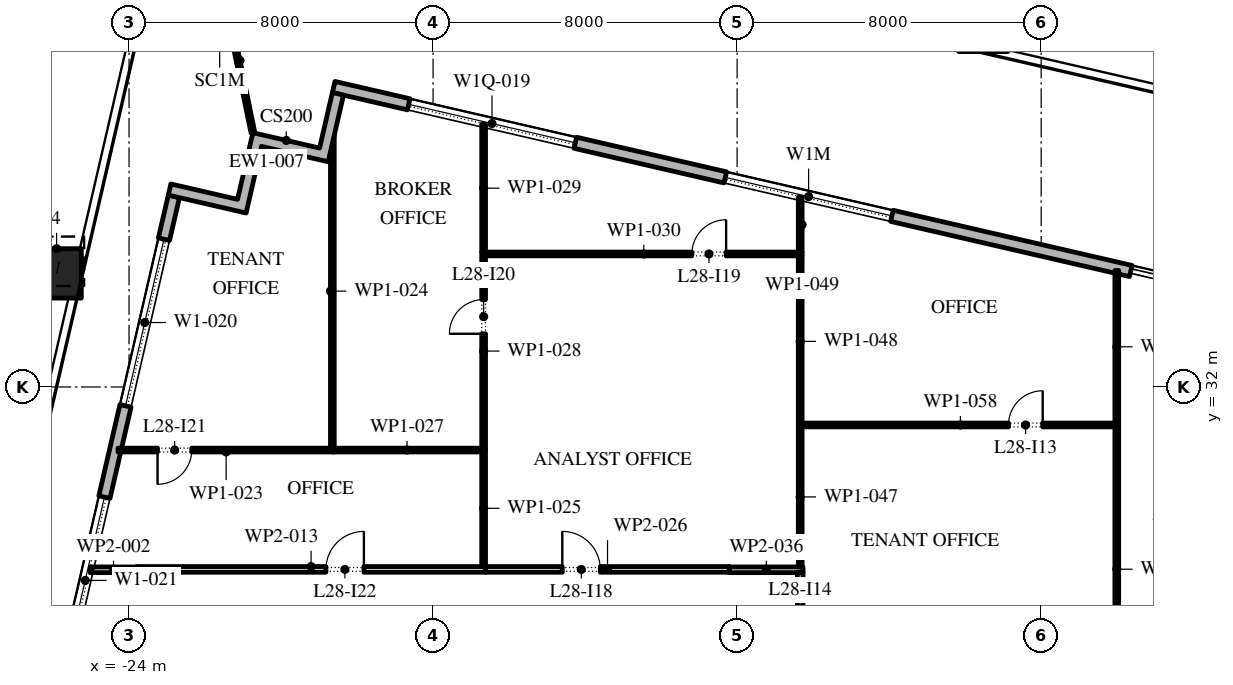
"""IFC4 building model, lengths in metres.
Left out: names, types, materials, properties, quantities, classifications, styles, units other than length and angle.
Written with IfcOpenShell. Run it as: python <this file> out.ifc"""

import sys

from ifc_helpers import new_model, si_unit, direction, frame, frame_2d, origin, origin_2d, place, context, subcontext, project, spatial, polyline, rectangle, outline, extrude, element, fill, save


model = new_model("IFC4")
c1 = context("Model", 3, precision=1e-05, world=origin(), true_north=direction((0.0, 1.0)))
c2 = subcontext(c1, "Body", "Model", "MODEL_VIEW")
j1 = project(units=[si_unit("LENGTHUNIT", "METRE"), si_unit("PLANEANGLEUNIT", "RADIAN")], contexts=[c1])
p1 = place(None, origin())
s1 = spatial("IfcSite", under=j1, at=p1, CompositionType="ELEMENT")
p2 = place(p1, origin())
s2 = spatial("IfcBuilding", under=s1, at=p2, CompositionType="ELEMENT")
p3 = place(p2, frame((0.0, 0.0, 130.8)))
s3 = spatial("IfcBuildingStorey", under=s2, at=p3, CompositionType="ELEMENT", Elevation=130.8)
p4 = place(p3, frame((-1.521, 41.475, 0.0), z_axis=(0.020377597275, 0.088167842757, 0.995897175934), x_axis=(-0.97431566651, 0.225186549318, 0.0)))
e1 = element("IfcColumn", 1, at=p4, inside=s3, PredefinedType="COLUMN", context=c2, shape_type="SweptSolid", body=[
    extrude(rectangle(XDim=1.3, YDim=1.3, at=origin_2d()), origin(), (0.0, 0.0, 1.0), 4.217),
])
p5 = place(p3, frame((-25.906, 34.989, 0.0), z_axis=(0.017502025619, 0.075687567741, 0.996977969259), x_axis=(-0.974290512438, 0.225295355862, 0.0)))
e2 = element("IfcColumn", 2, at=p5, inside=s3, PredefinedType="COLUMN", context=c2, shape_type="SweptSolid", body=[
    extrude(rectangle(XDim=1.3, YDim=1.3, at=origin_2d()), origin(), (0.0, 0.0, 1.0), 4.213),
])
p6 = place(p3, frame((31.078, 28.421, 0.0), z_axis=(0.0, 0.0, 1.0), x_axis=(-0.974370456532, 0.224949357493, 0.0)))
e3 = element("IfcWall", 3, at=p6, inside=s3, PredefinedType="STANDARD", context=c2, shape_type="SweptSolid", body=[
    extrude(rectangle(XDim=51.0, YDim=0.3, at=frame_2d((25.5, 0.0))), origin(), (0.0, 0.0, 1.0), 4.0),
])
p7 = place(p6, frame((1.875, 0.0, 0.45)))
e4 = element("IfcOpeningElement", 4, at=p7, cuts=e3, PredefinedType="OPENING", context=c2, shape_type="SweptSolid", body=[
    extrude(rectangle(XDim=4.5, YDim=2.95, at=frame_2d((2.25, 1.475))), frame((0.0, 0.16, 0.0), z_axis=(0.0, -1.0, 0.0), x_axis=(1.0, 0.0, 0.0)), (0.0, 0.0, 1.0), 0.32),
])
p8 = place(p6, frame((10.275, 0.0, 0.45)))
e5 = element("IfcOpeningElement", 5, at=p8, cuts=e3, PredefinedType="OPENING", context=c2, shape_type="SweptSolid", body=[
    extrude(rectangle(XDim=4.5, YDim=2.825, at=frame_2d((2.25, 1.413))), frame((0.0, 0.16, 0.0), z_axis=(0.0, -1.0, 0.0), x_axis=(1.0, 0.0, 0.0)), (0.0, 0.0, 1.0), 0.32),
])
p9 = place(p6, frame((18.825, 0.0, 0.45)))
e6 = element("IfcOpeningElement", 6, at=p9, cuts=e3, PredefinedType="OPENING", context=c2, shape_type="SweptSolid", body=[
    extrude(rectangle(XDim=4.5, YDim=2.8, at=frame_2d((2.25, 1.4))), frame((0.0, 0.16, 0.0), z_axis=(0.0, -1.0, 0.0), x_axis=(1.0, 0.0, 0.0)), (0.0, 0.0, 1.0), 0.32),
])
p10 = place(p6, frame((27.075, 0.0, 0.0)))
e7 = element("IfcOpeningElement", 7, at=p10, cuts=e3, PredefinedType="OPENING", context=c2, shape_type="SweptSolid", body=[
    extrude(rectangle(XDim=2.4, YDim=3.125, at=frame_2d((1.2, 1.562))), frame((0.0, 0.16, 0.0), z_axis=(0.0, -1.0, 0.0), x_axis=(1.0, 0.0, 0.0)), (0.0, 0.0, 1.0), 0.32),
])
p11 = place(p6, frame((35.925, 0.0, 0.45)))
e8 = element("IfcOpeningElement", 8, at=p11, cuts=e3, PredefinedType="OPENING", context=c2, shape_type="SweptSolid", body=[
    extrude(rectangle(XDim=4.5, YDim=2.575, at=frame_2d((2.25, 1.288))), frame((0.0, 0.16, 0.0), z_axis=(0.0, -1.0, 0.0), x_axis=(1.0, 0.0, 0.0)), (0.0, 0.0, 1.0), 0.32),
])
p12 = place(p6, frame((44.475, 0.0, 0.45)))
e9 = element("IfcOpeningElement", 9, at=p12, cuts=e3, PredefinedType="OPENING", context=c2, shape_type="SweptSolid", body=[
    extrude(rectangle(XDim=4.5, YDim=2.45, at=frame_2d((2.25, 1.225))), frame((0.0, 0.16, 0.0), z_axis=(0.0, -1.0, 0.0), x_axis=(1.0, 0.0, 0.0)), (0.0, 0.0, 1.0), 0.32),
])
p13 = place(p3, frame((-22.82, 37.016, 0.0), z_axis=(0.0, 0.0, 1.0), x_axis=(-0.224953880882, -0.974369412223, 0.0)))
e10 = element("IfcWall", 10, at=p13, inside=s3, PredefinedType="STANDARD", context=c2, shape_type="SweptSolid", body=[
    extrude(rectangle(XDim=49.5, YDim=0.3, at=frame_2d((24.75, 0.0))), origin(), (0.0, 0.0, 1.0), 4.0),
])
p14 = place(p13, frame((1.157, 0.0, 0.45)))
e11 = element("IfcOpeningElement", 11, at=p14, cuts=e10, PredefinedType="OPENING", context=c2, shape_type="SweptSolid", body=[
    extrude(rectangle(XDim=4.5, YDim=3.05, at=frame_2d((2.25, 1.525))), frame((0.0, 0.16, 0.0), z_axis=(0.0, -1.0, 0.0), x_axis=(1.0, 0.0, 0.0)), (0.0, 0.0, 1.0), 0.32),
])
p15 = place(p13, frame((8.121, 0.0, 0.45)))
e12 = element("IfcOpeningElement", 12, at=p15, cuts=e10, PredefinedType="OPENING", context=c2, shape_type="SweptSolid", body=[
    extrude(rectangle(XDim=4.5, YDim=3.05, at=frame_2d((2.25, 1.525))), frame((0.0, 0.16, 0.0), z_axis=(0.0, -1.0, 0.0), x_axis=(1.0, 0.0, 0.0)), (0.0, 0.0, 1.0), 0.32),
])
p16 = place(p13, frame((15.236, 0.0, 0.45)))
e13 = element("IfcOpeningElement", 13, at=p16, cuts=e10, PredefinedType="OPENING", context=c2, shape_type="SweptSolid", body=[
    extrude(rectangle(XDim=4.5, YDim=3.05, at=frame_2d((2.25, 1.525))), frame((0.0, 0.16, 0.0), z_axis=(0.0, -1.0, 0.0), x_axis=(1.0, 0.0, 0.0)), (0.0, 0.0, 1.0), 0.32),
])
p17 = place(p13, frame((23.4, 0.0, 0.0)))
e14 = element("IfcOpeningElement", 14, at=p17, cuts=e10, PredefinedType="OPENING", context=c2, shape_type="SweptSolid", body=[
    extrude(rectangle(XDim=2.4, YDim=3.5, at=frame_2d((1.2, 1.75))), frame((0.0, 0.16, 0.0), z_axis=(0.0, -1.0, 0.0), x_axis=(1.0, 0.0, 0.0)), (0.0, 0.0, 1.0), 0.32),
])
p18 = place(p13, frame((29.464, 0.0, 0.45)))
e15 = element("IfcOpeningElement", 15, at=p18, cuts=e10, PredefinedType="OPENING", context=c2, shape_type="SweptSolid", body=[
    extrude(rectangle(XDim=4.5, YDim=2.875, at=frame_2d((2.25, 1.438))), frame((0.0, 0.16, 0.0), z_axis=(0.0, -1.0, 0.0), x_axis=(1.0, 0.0, 0.0)), (0.0, 0.0, 1.0), 0.32),
])
p19 = place(p13, frame((36.579, 0.0, 0.45)))
e16 = element("IfcOpeningElement", 16, at=p19, cuts=e10, PredefinedType="OPENING", context=c2, shape_type="SweptSolid", body=[
    extrude(rectangle(XDim=4.5, YDim=2.675, at=frame_2d((2.25, 1.337))), frame((0.0, 0.16, 0.0), z_axis=(0.0, -1.0, 0.0), x_axis=(1.0, 0.0, 0.0)), (0.0, 0.0, 1.0), 0.32),
])
p20 = place(p13, frame((43.693, 0.0, 0.45)))
e17 = element("IfcOpeningElement", 17, at=p20, cuts=e10, PredefinedType="OPENING", context=c2, shape_type="SweptSolid", body=[
    extrude(rectangle(XDim=4.5, YDim=3.05, at=frame_2d((2.25, 1.525))), frame((0.0, 0.16, 0.0), z_axis=(0.0, -1.0, 0.0), x_axis=(1.0, 0.0, 0.0)), (0.0, 0.0, 1.0), 0.32),
])
p21 = place(p3, origin())
e18 = element("IfcWall", 18, at=p21, inside=s3, PredefinedType="STANDARD", context=c2, shape_type="SweptSolid", body=[
    extrude(outline(polyline([(-22.967, 37.049), (-22.899, 37.342), (-21.145, 36.937), (-20.74, 38.691), (-18.986, 38.286), (-18.649, 39.747), (-18.357, 39.68), (-18.762, 37.926), (-20.515, 38.331), (-20.92, 36.577), (-22.967, 37.049)])), origin(), (0.0, 0.0, 1.0), 4.0),
])
p22 = place(p3, frame((-20.74, 38.691, -0.05), z_axis=(0.0, 0.0, 1.0), x_axis=(-0.201477998796, 0.979493040302, 0.0)))
e19 = element("IfcWall", 19, at=p22, inside=s3, PredefinedType="STANDARD", context=c2, shape_type="SweptSolid", body=[
    extrude(rectangle(XDim=3.859, YDim=0.1, at=frame_2d((1.93, 0.0))), origin(), (0.0, 0.0, 1.0), 4.05),
])
p23 = place(p3, frame((-25.017, 27.19, 0.0), z_axis=(0.0, 0.0, 1.0), x_axis=(1.0, 0.0, 0.0)))
e20 = element("IfcWall", 20, at=p23, inside=s3, PredefinedType="PARTITIONING", context=c2, shape_type="SweptSolid", body=[
    extrude(rectangle(XDim=1.217, YDim=0.15, at=frame_2d((0.608, 0.0))), origin(), (0.0, 0.0, 1.0), 4.0),
])
p24 = place(p3, frame((-23.8, 27.2, 0.0), z_axis=(0.0, 0.0, 1.0), x_axis=(1.0, 0.0, 0.0)))
e21 = element("IfcWall", 21, at=p24, inside=s3, PredefinedType="PARTITIONING", context=c2, shape_type="SweptSolid", body=[
    extrude(rectangle(XDim=9.18, YDim=0.15, at=frame_2d((4.59, 0.0))), origin(), (0.0, 0.0, 1.0), 4.0),
])
p25 = place(p24, frame((4.98, 0.0, 0.0)))
e22 = element("IfcOpeningElement", 22, at=p25, cuts=e21, PredefinedType="OPENING", context=c2, shape_type="SweptSolid", body=[
    extrude(rectangle(XDim=1.0, YDim=2.1, at=frame_2d((0.5, 1.05))), frame((0.0, 0.085, 0.0), z_axis=(0.0, -1.0, 0.0), x_axis=(1.0, 0.0, 0.0)), (0.0, 0.0, 1.0), 0.17),
])
p26 = place(p3, frame((-18.6, 30.34, 0.0), z_axis=(0.0, 0.0, 1.0), x_axis=(-1.0, 0.0, 0.0)))
e23 = element("IfcWall", 23, at=p26, inside=s3, PredefinedType="PARTITIONING", context=c2, shape_type="SweptSolid", body=[
    extrude(rectangle(XDim=5.69, YDim=0.1, at=frame_2d((2.845, 0.0))), origin(), (0.0, 0.0, 1.0), 4.0),
])
p27 = place(p26, frame((3.75, 0.0, 0.0)))
e24 = element("IfcOpeningElement", 24, at=p27, cuts=e23, PredefinedType="OPENING", context=c2, shape_type="SweptSolid", body=[
    extrude(rectangle(XDim=0.9, YDim=2.1, at=frame_2d((0.45, 1.05))), frame((0.0, 0.06, 0.0), z_axis=(0.0, -1.0, 0.0), x_axis=(1.0, 0.0, 0.0)), (0.0, 0.0, 1.0), 0.12),
])
p28 = place(p3, frame((-18.65, 30.39, 0.0), z_axis=(0.0, 0.0, 1.0), x_axis=(0.0, 1.0, 0.0)))
e25 = element("IfcWall", 25, at=p28, inside=s3, PredefinedType="PARTITIONING", context=c2, shape_type="SweptSolid", body=[
    extrude(rectangle(XDim=8.264, YDim=0.1, at=frame_2d((4.132, 0.0))), origin(), (0.0, 0.0, 1.0), 4.0),
])
p29 = place(p3, frame((-14.67, 27.275, 0.0), z_axis=(0.0, 0.0, 1.0), x_axis=(0.0, 1.0, 0.0)))
e26 = element("IfcWall", 26, at=p29, inside=s3, PredefinedType="PARTITIONING", context=c2, shape_type="SweptSolid", body=[
    extrude(rectangle(XDim=3.065, YDim=0.1, at=frame_2d((1.533, 0.0))), origin(), (0.0, 0.0, 1.0), 4.0),
])
p30 = place(p3, frame((-14.62, 27.2, 0.0), z_axis=(0.0, 0.0, 1.0), x_axis=(1.0, 0.0, 0.0)))
e27 = element("IfcWall", 27, at=p30, inside=s3, PredefinedType="PARTITIONING", context=c2, shape_type="SweptSolid", body=[
    extrude(rectangle(XDim=6.42, YDim=0.15, at=frame_2d((3.21, 0.0))), origin(), (0.0, 0.0, 1.0), 4.0),
])
p31 = place(p30, frame((2.02, 0.0, 0.0)))
e28 = element("IfcOpeningElement", 28, at=p31, cuts=e27, PredefinedType="OPENING", context=c2, shape_type="SweptSolid", body=[
    extrude(rectangle(XDim=1.0, YDim=2.1, at=frame_2d((0.5, 1.05))), frame((0.0, 0.085, 0.0), z_axis=(0.0, -1.0, 0.0), x_axis=(1.0, 0.0, 0.0)), (0.0, 0.0, 1.0), 0.17),
])
p32 = place(p3, frame((-14.72, 30.34, 0.0), z_axis=(0.0, 0.0, 1.0), x_axis=(-1.0, 0.0, 0.0)))
e29 = element("IfcWall", 29, at=p32, inside=s3, PredefinedType="PARTITIONING", context=c2, shape_type="SweptSolid", body=[
    extrude(rectangle(XDim=3.93, YDim=0.1, at=frame_2d((1.965, 0.0))), origin(), (0.0, 0.0, 1.0), 4.0),
])
p33 = place(p3, frame((-14.67, 30.34, 0.0), z_axis=(0.0, 0.0, 1.0), x_axis=(0.0, 1.0, 0.0)))
e30 = element("IfcWall", 30, at=p33, inside=s3, PredefinedType="PARTITIONING", context=c2, shape_type="SweptSolid", body=[
    extrude(rectangle(XDim=5.21, YDim=0.1, at=frame_2d((2.605, 0.0))), origin(), (0.0, 0.0, 1.0), 4.0),
])
p34 = place(p33, frame((3.06, 0.0, 0.0)))
e31 = element("IfcOpeningElement", 31, at=p34, cuts=e30, PredefinedType="OPENING", context=c2, shape_type="SweptSolid", body=[
    extrude(rectangle(XDim=0.9, YDim=2.1, at=frame_2d((0.45, 1.05))), frame((0.0, 0.06, 0.0), z_axis=(0.0, -1.0, 0.0), x_axis=(1.0, 0.0, 0.0)), (0.0, 0.0, 1.0), 0.12),
])
p35 = place(p3, frame((-14.67, 35.55, 0.0), z_axis=(0.0, 0.0, 1.0), x_axis=(0.0, 1.0, 0.0)))
e32 = element("IfcWall", 32, at=p35, inside=s3, PredefinedType="PARTITIONING", context=c2, shape_type="SweptSolid", body=[
    extrude(rectangle(XDim=3.361, YDim=0.1, at=frame_2d((1.68, 0.0))), origin(), (0.0, 0.0, 1.0), 4.0),
])
p36 = place(p3, frame((-14.62, 35.5, 0.0), z_axis=(0.0, 0.0, 1.0), x_axis=(1.0, 0.0, 0.0)))
e33 = element("IfcWall", 33, at=p36, inside=s3, PredefinedType="PARTITIONING", context=c2, shape_type="SweptSolid", body=[
    extrude(rectangle(XDim=8.33, YDim=0.1, at=frame_2d((4.165, 0.0))), origin(), (0.0, 0.0, 1.0), 4.0),
])
p37 = place(p36, frame((5.43, 0.0, 0.0)))
e34 = element("IfcOpeningElement", 34, at=p37, cuts=e33, PredefinedType="OPENING", context=c2, shape_type="SweptSolid", body=[
    extrude(rectangle(XDim=0.9, YDim=2.1, at=frame_2d((0.45, 1.05))), frame((0.0, 0.06, 0.0), z_axis=(0.0, -1.0, 0.0), x_axis=(1.0, 0.0, 0.0)), (0.0, 0.0, 1.0), 0.12),
])
p38 = place(p3, frame((-8.2, 27.19, 0.0), z_axis=(0.0, 0.0, 1.0), x_axis=(1.0, 0.0, 0.0)))
e35 = element("IfcWall", 35, at=p38, inside=s3, PredefinedType="PARTITIONING", context=c2, shape_type="SweptSolid", body=[
    extrude(rectangle(XDim=1.935, YDim=0.15, at=frame_2d((0.968, 0.0))), origin(), (0.0, 0.0, 1.0), 4.0),
])
p39 = place(p3, frame((-6.34, 27.115, 0.0), z_axis=(0.0, 0.0, 1.0), x_axis=(0.0, -1.0, 0.0)))
e36 = element("IfcWall", 36, at=p39, inside=s3, PredefinedType="PARTITIONING", context=c2, shape_type="SweptSolid", body=[
    extrude(rectangle(XDim=3.655, YDim=0.15, at=frame_2d((1.828, 0.0))), origin(), (0.0, 0.0, 1.0), 4.0),
])
p40 = place(p39, frame((1.055, 0.0, 0.0)))
e37 = element("IfcOpeningElement", 37, at=p40, cuts=e36, PredefinedType="OPENING", context=c2, shape_type="SweptSolid", body=[
    extrude(rectangle(XDim=1.0, YDim=2.1, at=frame_2d((0.5, 1.05))), frame((0.0, 0.085, 0.0), z_axis=(0.0, -1.0, 0.0), x_axis=(1.0, 0.0, 0.0)), (0.0, 0.0, 1.0), 0.17),
])
p41 = place(p3, frame((-6.34, 27.265, 0.0), z_axis=(0.0, 0.0, 1.0), x_axis=(0.0, 1.0, 0.0)))
e38 = element("IfcWall", 38, at=p41, inside=s3, PredefinedType="PARTITIONING", context=c2, shape_type="SweptSolid", body=[
    extrude(rectangle(XDim=3.685, YDim=0.1, at=frame_2d((1.843, 0.0))), origin(), (0.0, 0.0, 1.0), 4.0),
])
p42 = place(p3, frame((-6.34, 30.95, 0.0), z_axis=(0.0, 0.0, 1.0), x_axis=(0.0, 1.0, 0.0)))
e39 = element("IfcWall", 39, at=p42, inside=s3, PredefinedType="PARTITIONING", context=c2, shape_type="SweptSolid", body=[
    extrude(rectangle(XDim=4.5, YDim=0.1, at=frame_2d((2.25, 0.0))), origin(), (0.0, 0.0, 1.0), 4.0),
])
p43 = place(p3, frame((-6.34, 35.55, 0.0), z_axis=(0.0, 0.0, 1.0), x_axis=(0.0, 1.0, 0.0)))
e40 = element("IfcWall", 40, at=p43, inside=s3, PredefinedType="PARTITIONING", context=c2, shape_type="SweptSolid", body=[
    extrude(rectangle(XDim=1.438, YDim=0.1, at=frame_2d((0.719, 0.0))), origin(), (0.0, 0.0, 1.0), 4.0),
])
p44 = place(p3, frame((2.04, 31.0, 0.0), z_axis=(0.0, 0.0, 1.0), x_axis=(-1.0, 0.0, 0.0)))
e41 = element("IfcWall", 41, at=p44, inside=s3, PredefinedType="PARTITIONING", context=c2, shape_type="SweptSolid", body=[
    extrude(rectangle(XDim=8.33, YDim=0.1, at=frame_2d((4.165, 0.0))), origin(), (0.0, 0.0, 1.0), 4.0),
])
p45 = place(p44, frame((2.0, 0.0, 0.0)))
e42 = element("IfcOpeningElement", 42, at=p45, cuts=e41, PredefinedType="OPENING", context=c2, shape_type="SweptSolid", body=[
    extrude(rectangle(XDim=0.9, YDim=2.1, at=frame_2d((0.45, 1.05))), frame((0.0, 0.06, 0.0), z_axis=(0.0, -1.0, 0.0), x_axis=(1.0, 0.0, 0.0)), (0.0, 0.0, 1.0), 0.12),
])
p46 = place(p3, frame((1.99, 30.95, 0.0), z_axis=(0.0, 0.0, 1.0), x_axis=(0.0, -1.0, 0.0)))
e43 = element("IfcWall", 43, at=p46, inside=s3, PredefinedType="PARTITIONING", context=c2, shape_type="SweptSolid", body=[
    extrude(rectangle(XDim=7.49, YDim=0.1, at=frame_2d((3.745, 0.0))), origin(), (0.0, 0.0, 1.0), 4.0),
])
p47 = place(p3, frame((1.99, 35.065, 0.0), z_axis=(0.0, 0.0, 1.0), x_axis=(0.0, -1.0, 0.0)))
e44 = element("IfcWall", 44, at=p47, inside=s3, PredefinedType="PARTITIONING", context=c2, shape_type="SweptSolid", body=[
    extrude(rectangle(XDim=4.015, YDim=0.1, at=frame_2d((2.007, 0.0))), origin(), (0.0, 0.0, 1.0), 4.0),
])
p48 = place(p10, origin())
e45 = element("IfcDoor", 45, at=p48, inside=s3, OperationType="DOUBLE_DOOR_SLIDING", PredefinedType="DOOR", context=c2, shape_type="SweptSolid", body=[
    extrude(rectangle(XDim=2.4, YDim=3.125, at=frame_2d((1.2, 1.562))), frame((0.0, 0.025, 0.0), z_axis=(0.0, -1.0, 0.0), x_axis=(1.0, 0.0, 0.0)), (0.0, 0.0, 1.0), 0.05),
])
fill(e7, e45)
p49 = place(p11, origin())
e46 = element("IfcWindow", 46, at=p49, inside=s3, PartitioningType="DOUBLE_PANEL_VERTICAL", PredefinedType="WINDOW", context=c2, shape_type="SweptSolid", body=[
    extrude(rectangle(XDim=4.5, YDim=2.575, at=frame_2d((2.25, 1.288))), frame((0.0, 0.03, 0.0), z_axis=(0.0, -1.0, 0.0), x_axis=(1.0, 0.0, 0.0)), (0.0, 0.0, 1.0), 0.06),
])
fill(e8, e46)
p50 = place(p12, origin())
e47 = element("IfcWindow", 47, at=p50, inside=s3, PartitioningType="DOUBLE_PANEL_VERTICAL", PredefinedType="WINDOW", context=c2, shape_type="SweptSolid", body=[
    extrude(rectangle(XDim=4.5, YDim=2.45, at=frame_2d((2.25, 1.225))), frame((0.0, 0.03, 0.0), z_axis=(0.0, -1.0, 0.0), x_axis=(1.0, 0.0, 0.0)), (0.0, 0.0, 1.0), 0.06),
])
fill(e9, e47)
p51 = place(p14, origin())
e48 = element("IfcWindow", 48, at=p51, inside=s3, PartitioningType="DOUBLE_PANEL_VERTICAL", PredefinedType="WINDOW", context=c2, shape_type="SweptSolid", body=[
    extrude(rectangle(XDim=4.5, YDim=3.05, at=frame_2d((2.25, 1.525))), frame((0.0, 0.03, 0.0), z_axis=(0.0, -1.0, 0.0), x_axis=(1.0, 0.0, 0.0)), (0.0, 0.0, 1.0), 0.06),
])
fill(e11, e48)
p52 = place(p15, origin())
e49 = element("IfcWindow", 49, at=p52, inside=s3, PartitioningType="DOUBLE_PANEL_VERTICAL", PredefinedType="WINDOW", context=c2, shape_type="SweptSolid", body=[
    extrude(rectangle(XDim=4.5, YDim=3.05, at=frame_2d((2.25, 1.525))), frame((0.0, 0.03, 0.0), z_axis=(0.0, -1.0, 0.0), x_axis=(1.0, 0.0, 0.0)), (0.0, 0.0, 1.0), 0.06),
])
fill(e12, e49)
p53 = place(p45, frame((0.9, 0.0, 0.0), z_axis=(0.0, 0.0, 1.0), x_axis=(-1.0, 0.0, 0.0)))
e50 = element("IfcDoor", 50, at=p53, inside=s3, OperationType="SINGLE_SWING_LEFT", PredefinedType="DOOR", context=c2, shape_type="SweptSolid", body=[
    extrude(rectangle(XDim=0.9, YDim=2.1, at=frame_2d((0.45, 1.05))), frame((0.0, 0.025, 0.0), z_axis=(0.0, -1.0, 0.0), x_axis=(1.0, 0.0, 0.0)), (0.0, 0.0, 1.0), 0.05),
])
fill(e42, e50)
p54 = place(p31, origin())
e51 = element("IfcDoor", 51, at=p54, inside=s3, OperationType="SINGLE_SWING_RIGHT", PredefinedType="DOOR", context=c2, shape_type="SweptSolid", body=[
    extrude(rectangle(XDim=1.0, YDim=2.1, at=frame_2d((0.5, 1.05))), frame((0.0, 0.025, 0.0), z_axis=(0.0, -1.0, 0.0), x_axis=(1.0, 0.0, 0.0)), (0.0, 0.0, 1.0), 0.05),
])
fill(e28, e51)
p55 = place(p37, origin())
e52 = element("IfcDoor", 52, at=p55, inside=s3, OperationType="SINGLE_SWING_LEFT", PredefinedType="DOOR", context=c2, shape_type="SweptSolid", body=[
    extrude(rectangle(XDim=0.9, YDim=2.1, at=frame_2d((0.45, 1.05))), frame((0.0, 0.025, 0.0), z_axis=(0.0, -1.0, 0.0), x_axis=(1.0, 0.0, 0.0)), (0.0, 0.0, 1.0), 0.05),
])
fill(e34, e52)
p56 = place(p34, origin())
e53 = element("IfcDoor", 53, at=p56, inside=s3, OperationType="SINGLE_SWING_RIGHT", PredefinedType="DOOR", context=c2, shape_type="SweptSolid", body=[
    extrude(rectangle(XDim=0.9, YDim=2.1, at=frame_2d((0.45, 1.05))), frame((0.0, 0.025, 0.0), z_axis=(0.0, -1.0, 0.0), x_axis=(1.0, 0.0, 0.0)), (0.0, 0.0, 1.0), 0.05),
])
fill(e31, e53)
p57 = place(p27, origin())
e54 = element("IfcDoor", 54, at=p57, inside=s3, OperationType="SINGLE_SWING_LEFT", PredefinedType="DOOR", context=c2, shape_type="SweptSolid", body=[
    extrude(rectangle(XDim=0.9, YDim=2.1, at=frame_2d((0.45, 1.05))), frame((0.0, 0.025, 0.0), z_axis=(0.0, -1.0, 0.0), x_axis=(1.0, 0.0, 0.0)), (0.0, 0.0, 1.0), 0.05),
])
fill(e24, e54)
p58 = place(p25, origin())
e55 = element("IfcDoor", 55, at=p58, inside=s3, OperationType="SINGLE_SWING_LEFT", PredefinedType="DOOR", context=c2, shape_type="SweptSolid", body=[
    extrude(rectangle(XDim=1.0, YDim=2.1, at=frame_2d((0.5, 1.05))), frame((0.0, 0.025, 0.0), z_axis=(0.0, -1.0, 0.0), x_axis=(1.0, 0.0, 0.0)), (0.0, 0.0, 1.0), 0.05),
])
fill(e22, e55)
save(model, sys.argv[1])
